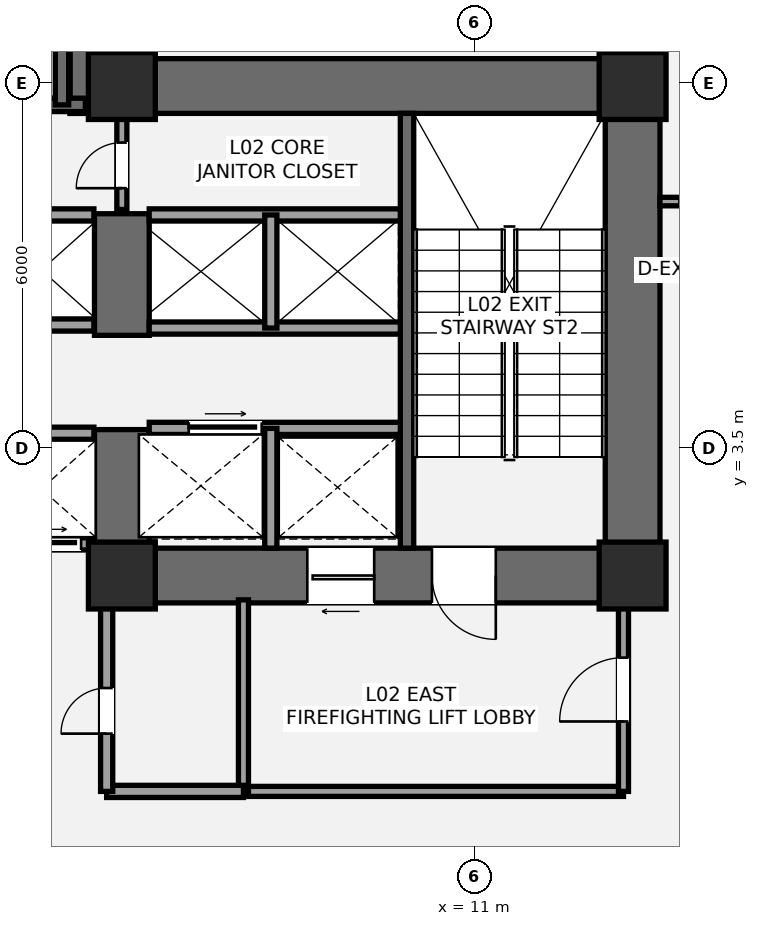
"""IFC4 building model, lengths in metres.
Left out: names, types, materials, properties, quantities, classifications, styles, units other than length and angle.
Written with IfcOpenShell. Run it as: python <this file> out.ifc"""

import sys

from ifc_helpers import new_model, si_unit, direction, frame, frame_2d, origin, origin_2d, place, context, subcontext, project, spatial, rectangle, extrude, element, fill, save


model = new_model("IFC4")
c1 = context("Model", 3, precision=1e-05, world=origin(), true_north=direction((0.0, 1.0)))
c2 = subcontext(c1, "Body", "Model", "MODEL_VIEW")
j1 = project(units=[si_unit("LENGTHUNIT", "METRE"), si_unit("PLANEANGLEUNIT", "RADIAN")], contexts=[c1])
p1 = place(None, origin())
s1 = spatial("IfcSite", under=j1, at=p1, CompositionType="ELEMENT")
p2 = place(p1, origin())
s2 = spatial("IfcBuilding", under=s1, at=p2, CompositionType="ELEMENT")
p3 = place(p2, frame((0.0, 0.0, 10.2)))
s3 = spatial("IfcBuildingStorey", under=s2, at=p3, CompositionType="ELEMENT", Elevation=10.2)
p4 = place(p3, frame((13.6, 0.95, 0.0), z_axis=(0.0, 0.0, 1.0), x_axis=(0.0, 1.0, 0.0)))
e1 = element("IfcWall", 1, at=p4, inside=s3, PredefinedType="SHEAR", context=c2, shape_type="SweptSolid", body=[
    extrude(rectangle(XDim=8.95, YDim=0.9, at=frame_2d((4.475, 0.0))), origin(), (0.0, 0.0, 1.0), 4.2),
])
p5 = place(p3, frame((4.35, 9.45, 0.0), z_axis=(0.0, 0.0, 1.0), x_axis=(1.0, 0.0, 0.0)))
e2 = element("IfcWall", 2, at=p5, inside=s3, PredefinedType="SHEAR", context=c2, shape_type="SweptSolid", body=[
    extrude(rectangle(XDim=9.7, YDim=0.9, at=frame_2d((4.85, 0.0))), origin(), (0.0, 0.0, 1.0), 4.2),
])
p6 = place(p3, frame((14.05, 1.4, 0.0), z_axis=(0.0, 0.0, 1.0), x_axis=(-1.0, 0.0, 0.0)))
e3 = element("IfcWall", 3, at=p6, inside=s3, PredefinedType="SHEAR", context=c2, shape_type="SweptSolid", body=[
    extrude(rectangle(XDim=9.3, YDim=0.9, at=frame_2d((4.65, 0.0))), origin(), (0.0, 0.0, 1.0), 4.2),
])
p7 = place(p6, frame((2.7, 0.0, 0.0)))
e4 = element("IfcOpeningElement", 4, at=p7, cuts=e3, PredefinedType="OPENING", context=c2, shape_type="SweptSolid", body=[
    extrude(rectangle(XDim=1.05, YDim=2.15, at=frame_2d((0.525, 1.075))), frame((0.0, 0.46, 0.0), z_axis=(0.0, -1.0, 0.0), x_axis=(1.0, 0.0, 0.0)), (0.0, 0.0, 1.0), 0.92),
])
p8 = place(p6, frame((4.7, 0.0, 0.0)))
e5 = element("IfcOpeningElement", 5, at=p8, cuts=e3, PredefinedType="OPENING", context=c2, shape_type="SweptSolid", body=[
    extrude(rectangle(XDim=1.1, YDim=2.2, at=frame_2d((0.55, 1.1))), frame((0.0, 0.46, 0.0), z_axis=(0.0, -1.0, 0.0), x_axis=(1.0, 0.0, 0.0)), (0.0, 0.0, 1.0), 0.92),
])
p9 = place(p3, frame((5.2, 0.95, 0.0), z_axis=(0.0, 0.0, 1.0), x_axis=(0.0, 1.0, 0.0)))
e6 = element("IfcWall", 6, at=p9, inside=s3, PredefinedType="SHEAR", context=c2, shape_type="SweptSolid", body=[
    extrude(rectangle(XDim=2.85, YDim=0.9, at=frame_2d((1.425, 0.0))), origin(), (0.0, 0.0, 1.0), 4.2),
])
p10 = place(p3, frame((5.2, 5.35, 0.0), z_axis=(0.0, 0.0, 1.0), x_axis=(0.0, 1.0, 0.0)))
e7 = element("IfcWall", 7, at=p10, inside=s3, PredefinedType="SHEAR", context=c2, shape_type="SweptSolid", body=[
    extrude(rectangle(XDim=2.0, YDim=0.9, at=frame_2d((1.0, 0.0))), origin(), (0.0, 0.0, 1.0), 4.2),
])
p11 = place(p3, frame((9.89, 1.85, 0.0), z_axis=(0.0, 0.0, 1.0), x_axis=(0.0, 1.0, 0.0)))
e8 = element("IfcWall", 8, at=p11, inside=s3, PredefinedType="SHEAR", context=c2, shape_type="SweptSolid", body=[
    extrude(rectangle(XDim=7.15, YDim=0.22, at=frame_2d((3.575, 0.0))), origin(), (0.0, 0.0, 1.0), 4.2),
])
p12 = place(p3, frame((4.8, 9.0, 0.0), z_axis=(0.0, 0.0, 1.0), x_axis=(0.0, 1.0, 0.0)))
e9 = element("IfcWall", 9, at=p12, inside=s3, PredefinedType="SHEAR", context=c2, shape_type="SweptSolid", body=[
    extrude(rectangle(XDim=4.3, YDim=0.9, at=frame_2d((2.15, 0.0))), origin(), (0.0, 0.0, 1.0), 4.2),
])
p13 = place(p3, frame((-4.7, 9.14, 0.0), z_axis=(0.0, 0.0, 1.0), x_axis=(1.0, 0.0, 0.0)))
e10 = element("IfcWall", 10, at=p13, inside=s3, PredefinedType="SHEAR", context=c2, shape_type="SweptSolid", body=[
    extrude(rectangle(XDim=9.3, YDim=0.22, at=frame_2d((4.65, 0.0))), origin(), (0.0, 0.0, 1.0), 4.2),
])
p14 = place(p13, frame((1.15, 0.0, 0.0)))
e11 = element("IfcOpeningElement", 11, at=p14, cuts=e10, PredefinedType="OPENING", context=c2, shape_type="SweptSolid", body=[
    extrude(rectangle(XDim=1.05, YDim=2.15, at=frame_2d((0.525, 1.075))), frame((0.0, 0.12, 0.0), z_axis=(0.0, -1.0, 0.0), x_axis=(1.0, 0.0, 0.0)), (0.0, 0.0, 1.0), 0.24),
])
p15 = place(p3, frame((4.215, 9.14, 0.0), z_axis=(0.0, 0.0, 1.0), x_axis=(0.0, 1.0, 0.0)))
e12 = element("IfcWall", 12, at=p15, inside=s3, PredefinedType="SHEAR", context=c2, shape_type="SweptSolid", body=[
    extrude(rectangle(XDim=3.26, YDim=0.22, at=frame_2d((1.63, 0.0))), origin(), (0.0, 0.0, 1.0), 4.2),
])
for number, where, z_axis, x_axis in (
    (13, (5.2, 1.4, 0.0), (0.0, 0.0, 1.0), (1.0, 0.0, 0.0)),
    (14, (5.2, 9.45, 0.0), (0.0, 0.0, 1.0), (1.0, 0.0, 0.0)),
    (15, (13.6, 1.4, 0.0), (0.0, 0.0, 1.0), (1.0, 0.0, 0.0)),
    (16, (13.6, 9.45, 0.0), (0.0, 0.0, 1.0), (1.0, 0.0, 0.0)),
):
    element("IfcColumn", number, at=place(p3, frame(where, z_axis=z_axis, x_axis=x_axis)), inside=s3, PredefinedType="COLUMN", context=c2, shape_type="SweptSolid", body=[
        extrude(rectangle(XDim=1.1, YDim=1.1, at=origin_2d()), origin(), (0.0, 0.0, 1.0), 4.2),
    ])
p16 = place(p3, frame((7.2, -2.15, 0.0), z_axis=(0.0, 0.0, 1.0), x_axis=(1.0, 0.0, 0.0)))
e17 = element("IfcWall", 17, at=p16, inside=s3, PredefinedType="PARTITIONING", context=c2, shape_type="SweptSolid", body=[
    extrude(rectangle(XDim=6.25, YDim=0.165, at=frame_2d((3.125, 0.0))), origin(), (0.0, 0.0, 1.0), 3.98),
])
p17 = place(p3, frame((7.2, -2.15, 0.0), z_axis=(0.0, 0.0, 1.0), x_axis=(0.0, 1.0, 0.0)))
e18 = element("IfcWall", 18, at=p17, inside=s3, PredefinedType="PARTITIONING", context=c2, shape_type="SweptSolid", body=[
    extrude(rectangle(XDim=3.15, YDim=0.165, at=frame_2d((1.575, 0.0))), origin(), (0.0, 0.0, 1.0), 3.98),
])
p18 = place(p3, frame((13.45, -2.15, 0.0), z_axis=(0.0, 0.0, 1.0), x_axis=(0.0, 1.0, 0.0)))
e19 = element("IfcWall", 19, at=p18, inside=s3, PredefinedType="PARTITIONING", context=c2, shape_type="SweptSolid", body=[
    extrude(rectangle(XDim=3.15, YDim=0.165, at=frame_2d((1.575, 0.0))), origin(), (0.0, 0.0, 1.0), 3.433),
])
p19 = place(p18, frame((1.15, 0.0, 0.0)))
e20 = element("IfcOpeningElement", 20, at=p19, cuts=e19, PredefinedType="OPENING", context=c2, shape_type="SweptSolid", body=[
    extrude(rectangle(XDim=1.05, YDim=2.15, at=frame_2d((0.525, 1.075))), frame((0.0, 0.093, 0.0), z_axis=(0.0, -1.0, 0.0), x_axis=(1.0, 0.0, 0.0)), (0.0, 0.0, 1.0), 0.185),
])
p20 = place(p3, frame((4.95, -2.15, 0.0), z_axis=(0.0, 0.0, 1.0), x_axis=(1.0, 0.0, 0.0)))
e21 = element("IfcWall", 21, at=p20, inside=s3, PredefinedType="SOLIDWALL", context=c2, shape_type="SweptSolid", body=[
    extrude(rectangle(XDim=2.25, YDim=0.2, at=frame_2d((1.125, 0.0))), origin(), (0.0, 0.0, 1.0), 3.98),
])
p21 = place(p3, frame((4.95, -2.15, 0.0), z_axis=(0.0, 0.0, 1.0), x_axis=(0.0, 1.0, 0.0)))
e22 = element("IfcWall", 22, at=p21, inside=s3, PredefinedType="SOLIDWALL", context=c2, shape_type="SweptSolid", body=[
    extrude(rectangle(XDim=3.15, YDim=0.2, at=frame_2d((1.575, 0.0))), origin(), (0.0, 0.0, 1.0), 3.348),
])
p22 = place(p21, frame((0.95, 0.0, 0.0)))
e23 = element("IfcOpeningElement", 23, at=p22, cuts=e22, PredefinedType="OPENING", context=c2, shape_type="SweptSolid", body=[
    extrude(rectangle(XDim=0.75, YDim=2.1, at=frame_2d((0.375, 1.05))), frame((0.0, 0.11, 0.0), z_axis=(0.0, -1.0, 0.0), x_axis=(1.0, 0.0, 0.0)), (0.0, 0.0, 1.0), 0.22),
])
p23 = place(p3, frame((5.65, 3.82, 0.0), z_axis=(0.0, 0.0, 1.0), x_axis=(1.0, 0.0, 0.0)))
e24 = element("IfcWall", 24, at=p23, inside=s3, PredefinedType="SOLIDWALL", context=c2, shape_type="SweptSolid", body=[
    extrude(rectangle(XDim=4.13, YDim=0.2, at=frame_2d((2.065, 0.0))), origin(), (0.0, 0.0, 1.0), 3.98),
])
p24 = place(p23, frame((0.65, 0.0, 0.0)))
e25 = element("IfcOpeningElement", 25, at=p24, cuts=e24, PredefinedType="OPENING", context=c2, shape_type="SweptSolid", body=[
    extrude(rectangle(XDim=1.2, YDim=2.2, at=frame_2d((0.6, 1.1))), frame((0.0, 0.11, 0.0), z_axis=(0.0, -1.0, 0.0), x_axis=(1.0, 0.0, 0.0)), (0.0, 0.0, 1.0), 0.22),
])
p25 = place(p3, frame((7.65, 1.85, 0.0), z_axis=(0.0, 0.0, 1.0), x_axis=(0.0, 1.0, 0.0)))
e26 = element("IfcWall", 26, at=p25, inside=s3, PredefinedType="SOLIDWALL", context=c2, shape_type="SweptSolid", body=[
    extrude(rectangle(XDim=1.97, YDim=0.2, at=frame_2d((0.985, 0.0))), origin(), (0.0, 0.0, 1.0), 3.98),
])
for number, where, z_axis, x_axis in (
    (27, (5.65, 5.47, 0.0), (0.0, 0.0, 1.0), (1.0, 0.0, 0.0)),
    (28, (5.65, 7.33, 0.0), (0.0, 0.0, 1.0), (1.0, 0.0, 0.0)),
):
    element("IfcWall", number, at=place(p3, frame(where, z_axis=z_axis, x_axis=x_axis)), inside=s3, PredefinedType="SOLIDWALL", context=c2, shape_type="SweptSolid", body=[
        extrude(rectangle(XDim=4.13, YDim=0.2, at=frame_2d((2.065, 0.0))), origin(), (0.0, 0.0, 1.0), 3.98),
    ])
p26 = place(p3, frame((7.65, 5.47, 0.0), z_axis=(0.0, 0.0, 1.0), x_axis=(0.0, 1.0, 0.0)))
e29 = element("IfcWall", 29, at=p26, inside=s3, PredefinedType="SOLIDWALL", context=c2, shape_type="SweptSolid", body=[
    extrude(rectangle(XDim=1.86, YDim=0.2, at=frame_2d((0.93, 0.0))), origin(), (0.0, 0.0, 1.0), 3.98),
])
p27 = place(p3, frame((0.88, 1.92, 0.0), z_axis=(0.0, 0.0, 1.0), x_axis=(1.0, 0.0, 0.0)))
e30 = element("IfcWall", 30, at=p27, inside=s3, PredefinedType="SOLIDWALL", context=c2, shape_type="SweptSolid", body=[
    extrude(rectangle(XDim=3.86, YDim=0.2, at=frame_2d((1.93, 0.0))), origin(), (0.0, 0.0, 1.0), 2.97),
])
p28 = place(p27, frame((0.55, 0.0, 0.0)))
e31 = element("IfcOpeningElement", 31, at=p28, cuts=e30, PredefinedType="OPENING", context=c2, shape_type="SweptSolid", body=[
    extrude(rectangle(XDim=1.1, YDim=2.2, at=frame_2d((0.55, 1.1))), frame((0.0, 0.11, 0.0), z_axis=(0.0, -1.0, 0.0), x_axis=(1.0, 0.0, 0.0)), (0.0, 0.0, 1.0), 0.22),
])
p29 = place(p27, frame((2.55, 0.0, 0.0)))
e32 = element("IfcOpeningElement", 32, at=p29, cuts=e30, PredefinedType="OPENING", context=c2, shape_type="SweptSolid", body=[
    extrude(rectangle(XDim=1.1, YDim=2.2, at=frame_2d((0.55, 1.1))), frame((0.0, 0.11, 0.0), z_axis=(0.0, -1.0, 0.0), x_axis=(1.0, 0.0, 0.0)), (0.0, 0.0, 1.0), 0.22),
])
for number, where, z_axis, x_axis in (
    (33, (0.88, 3.74, 0.0), (0.0, 0.0, 1.0), (1.0, 0.0, 0.0)),
    (34, (0.88, 5.52, 0.0), (0.0, 0.0, 1.0), (1.0, 0.0, 0.0)),
    (35, (0.88, 7.33, 0.0), (0.0, 0.0, 1.0), (1.0, 0.0, 0.0)),
):
    element("IfcWall", number, at=place(p3, frame(where, z_axis=z_axis, x_axis=x_axis)), inside=s3, PredefinedType="SOLIDWALL", context=c2, shape_type="SweptSolid", body=[
        extrude(rectangle(XDim=3.86, YDim=0.2, at=frame_2d((1.93, 0.0))), origin(), (0.0, 0.0, 1.0), 3.98),
    ])
p30 = place(p3, frame((5.2, 7.42, 0.0), z_axis=(0.0, 0.0, 1.0), x_axis=(0.0, 1.0, 0.0)))
e36 = element("IfcWall", 36, at=p30, inside=s3, PredefinedType="PARTITIONING", context=c2, shape_type="SweptSolid", body=[
    extrude(rectangle(XDim=1.58, YDim=0.165, at=frame_2d((0.79, 0.0))), origin(), (0.0, 0.0, 1.0), 3.98),
])
p31 = place(p30, frame((0.35, 0.0, 0.0)))
e37 = element("IfcOpeningElement", 37, at=p31, cuts=e36, PredefinedType="OPENING", context=c2, shape_type="SweptSolid", body=[
    extrude(rectangle(XDim=0.75, YDim=2.1, at=frame_2d((0.375, 1.05))), frame((0.0, 0.093, 0.0), z_axis=(0.0, -1.0, 0.0), x_axis=(1.0, 0.0, 0.0)), (0.0, 0.0, 1.0), 0.185),
])
p32 = place(p3, frame((14.05, 7.55, 0.0), z_axis=(0.0, 0.0, 1.0), x_axis=(1.0, 0.0, 0.0)))
e38 = element("IfcWall", 38, at=p32, inside=s3, PredefinedType="PARTITIONING", context=c2, shape_type="SweptSolid", body=[
    extrude(rectangle(XDim=2.35, YDim=0.14, at=frame_2d((1.175, 0.0))), origin(), (0.0, 0.0, 1.0), 3.433),
])
p33 = place(p32, frame((0.32, 0.0, 0.0)))
e39 = element("IfcOpeningElement", 39, at=p33, cuts=e38, PredefinedType="OPENING", context=c2, shape_type="SweptSolid", body=[
    extrude(rectangle(XDim=0.92, YDim=2.15, at=frame_2d((0.46, 1.075))), frame((0.0, 0.08, 0.0), z_axis=(0.0, -1.0, 0.0), x_axis=(1.0, 0.0, 0.0)), (0.0, 0.0, 1.0), 0.16),
])
p34 = place(p7, origin())
e40 = element("IfcDoor", 40, at=p34, inside=s3, OperationType="SINGLE_SWING_LEFT", PredefinedType="DOOR", context=c2, shape_type="SweptSolid", body=[
    extrude(rectangle(XDim=1.05, YDim=2.15, at=frame_2d((0.525, 1.075))), frame((0.0, 0.025, 0.0), z_axis=(0.0, -1.0, 0.0), x_axis=(1.0, 0.0, 0.0)), (0.0, 0.0, 1.0), 0.05),
])
fill(e4, e40)
p35 = place(p19, origin())
e41 = element("IfcDoor", 41, at=p35, inside=s3, OperationType="SINGLE_SWING_LEFT", PredefinedType="DOOR", context=c2, shape_type="SweptSolid", body=[
    extrude(rectangle(XDim=1.05, YDim=2.15, at=frame_2d((0.525, 1.075))), frame((0.0, 0.025, 0.0), z_axis=(0.0, -1.0, 0.0), x_axis=(1.0, 0.0, 0.0)), (0.0, 0.0, 1.0), 0.05),
])
fill(e20, e41)
p36 = place(p22, origin())
e42 = element("IfcDoor", 42, at=p36, inside=s3, OperationType="SINGLE_SWING_LEFT", PredefinedType="DOOR", context=c2, shape_type="SweptSolid", body=[
    extrude(rectangle(XDim=0.75, YDim=2.1, at=frame_2d((0.375, 1.05))), frame((0.0, 0.025, 0.0), z_axis=(0.0, -1.0, 0.0), x_axis=(1.0, 0.0, 0.0)), (0.0, 0.0, 1.0), 0.05),
])
fill(e23, e42)
p37 = place(p8, origin())
e43 = element("IfcDoor", 43, at=p37, inside=s3, OperationType="SLIDING_TO_LEFT", PredefinedType="DOOR", context=c2, shape_type="SweptSolid", body=[
    extrude(rectangle(XDim=1.1, YDim=2.2, at=frame_2d((0.55, 1.1))), frame((0.0, 0.025, 0.0), z_axis=(0.0, -1.0, 0.0), x_axis=(1.0, 0.0, 0.0)), (0.0, 0.0, 1.0), 0.05),
])
fill(e5, e43)
p38 = place(p24, origin())
e44 = element("IfcDoor", 44, at=p38, inside=s3, OperationType="SLIDING_TO_RIGHT", PredefinedType="DOOR", context=c2, shape_type="SweptSolid", body=[
    extrude(rectangle(XDim=1.2, YDim=2.2, at=frame_2d((0.6, 1.1))), frame((0.0, 0.025, 0.0), z_axis=(0.0, -1.0, 0.0), x_axis=(1.0, 0.0, 0.0)), (0.0, 0.0, 1.0), 0.05),
])
fill(e25, e44)
p39 = place(p29, origin())
e45 = element("IfcDoor", 45, at=p39, inside=s3, OperationType="SLIDING_TO_LEFT", PredefinedType="DOOR", context=c2, shape_type="SweptSolid", body=[
    extrude(rectangle(XDim=1.1, YDim=2.2, at=frame_2d((0.55, 1.1))), frame((0.0, 0.025, 0.0), z_axis=(0.0, -1.0, 0.0), x_axis=(1.0, 0.0, 0.0)), (0.0, 0.0, 1.0), 0.05),
])
fill(e32, e45)
p40 = place(p31, origin())
e46 = element("IfcDoor", 46, at=p40, inside=s3, OperationType="SINGLE_SWING_LEFT", PredefinedType="DOOR", context=c2, shape_type="SweptSolid", body=[
    extrude(rectangle(XDim=0.75, YDim=2.1, at=frame_2d((0.375, 1.05))), frame((0.0, 0.025, 0.0), z_axis=(0.0, -1.0, 0.0), x_axis=(1.0, 0.0, 0.0)), (0.0, 0.0, 1.0), 0.05),
])
fill(e37, e46)
save(model, sys.argv[1])
